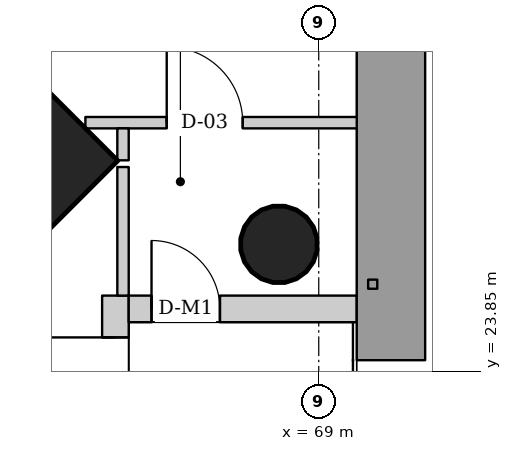
"""IFC4 building model, lengths in metres.
Left out: names, types, materials, properties, quantities, classifications, styles, units other than length and angle.
Written with IfcOpenShell. Run it as: python <this file> out.ifc"""

import sys

from ifc_helpers import new_model, si_unit, direction, frame, frame_2d, origin, origin_2d, place, context, subcontext, project, spatial, rectangle, hollow_circle, extrude, element, fill, save


model = new_model("IFC4")
c1 = context("Model", 3, precision=1e-05, world=origin(), true_north=direction((0.0, 1.0)))
c2 = subcontext(c1, "Body", "Model", "MODEL_VIEW")
j1 = project(units=[si_unit("LENGTHUNIT", "METRE"), si_unit("PLANEANGLEUNIT", "RADIAN")], contexts=[c1])
p1 = place(None, origin())
s1 = spatial("IfcSite", under=j1, at=p1, CompositionType="ELEMENT")
p2 = place(p1, origin())
s2 = spatial("IfcBuilding", under=s1, at=p2, CompositionType="ELEMENT")
p3 = place(p2, frame((0.0, 0.0, 36.2)))
s3 = spatial("IfcBuildingStorey", under=s2, at=p3, CompositionType="ELEMENT", Elevation=36.2)
p4 = place(p3, frame((68.514, 25.486, 0.0), z_axis=(-0.031962158256, 0.031962158256, 0.998977898093), x_axis=(-0.707106781187, -0.707106781187, 0.0)))
e1 = element("IfcColumn", 1, at=p4, inside=s3, PredefinedType="COLUMN", context=c2, shape_type="SweptSolid", body=[
    extrude(hollow_circle(Radius=0.508, WallThickness=0.04, at=origin_2d()), origin(), (0.0, 0.0, 1.0), 3.804),
])
p5 = place(p3, frame((64.414, 26.586, 0.0), z_axis=(-0.031898107953, 0.031898107953, 0.998981992539), x_axis=(-0.707106781187, -0.707106781187, 0.0)))
e2 = element("IfcColumn", 2, at=p5, inside=s3, PredefinedType="COLUMN", context=c2, shape_type="SweptSolid", body=[
    extrude(rectangle(XDim=2.8, YDim=2.8, at=origin_2d()), origin(), (0.0, 0.0, 1.0), 3.804),
])
p6 = place(p3, frame((66.325, 21.5, 0.0), z_axis=(0.0, 0.0, 1.0), x_axis=(0.0, 1.0, 0.0)))
e3 = element("IfcWall", 3, at=p6, inside=s3, PredefinedType="SOLIDWALL", context=c2, shape_type="SweptSolid", body=[
    extrude(rectangle(XDim=3.35, YDim=0.35, at=frame_2d((1.675, 0.0))), origin(), (0.0, 0.0, 1.0), 3.62),
])
p7 = place(p6, frame((1.8, 0.0, 0.0)))
e4 = element("IfcOpeningElement", 4, at=p7, cuts=e3, PredefinedType="OPENING", context=c2, shape_type="SweptSolid", body=[
    extrude(rectangle(XDim=1.0, YDim=2.4, at=frame_2d((0.5, 1.2))), frame((0.0, 0.185, 0.0), z_axis=(0.0, -1.0, 0.0), x_axis=(1.0, 0.0, 0.0)), (0.0, 0.0, 1.0), 0.37),
])
p8 = place(p3, frame((66.5, 24.675, 0.0), z_axis=(0.0, 0.0, 1.0), x_axis=(1.0, 0.0, 0.0)))
e5 = element("IfcWall", 5, at=p8, inside=s3, PredefinedType="SOLIDWALL", context=c2, shape_type="SweptSolid", body=[
    extrude(rectangle(XDim=3.0, YDim=0.35, at=frame_2d((1.5, 0.0))), origin(), (0.0, 0.0, 1.0), 3.62),
])
p9 = place(p8, frame((0.3, 0.0, 0.0)))
e6 = element("IfcOpeningElement", 6, at=p9, cuts=e5, PredefinedType="OPENING", context=c2, shape_type="SweptSolid", body=[
    extrude(rectangle(XDim=0.9, YDim=2.1, at=frame_2d((0.45, 1.05))), frame((0.0, 0.185, 0.0), z_axis=(0.0, -1.0, 0.0), x_axis=(1.0, 0.0, 0.0)), (0.0, 0.0, 1.0), 0.37),
])
p10 = place(p3, frame((65.93, 27.125, 0.0), z_axis=(0.0, 0.0, 1.0), x_axis=(1.0, 0.0, 0.0)))
e7 = element("IfcWall", 7, at=p10, inside=s3, PredefinedType="PARTITIONING", context=c2, shape_type="SweptSolid", body=[
    extrude(rectangle(XDim=3.61, YDim=0.15, at=frame_2d((1.805, 0.0))), origin(), (0.0, 0.0, 1.0), 3.02),
])
p11 = place(p10, frame((1.07, 0.0, 0.0)))
e8 = element("IfcOpeningElement", 8, at=p11, cuts=e7, PredefinedType="OPENING", context=c2, shape_type="SweptSolid", body=[
    extrude(rectangle(XDim=1.0, YDim=2.1, at=frame_2d((0.5, 1.05))), frame((0.0, 0.085, 0.0), z_axis=(0.0, -1.0, 0.0), x_axis=(1.0, 0.0, 0.0)), (0.0, 0.0, 1.0), 0.17),
])
p12 = place(p3, frame((66.425, 27.05, 0.0), z_axis=(0.0, 0.0, 1.0), x_axis=(0.0, -1.0, 0.0)))
e9 = element("IfcWall", 9, at=p12, inside=s3, PredefinedType="PARTITIONING", context=c2, shape_type="SweptSolid", body=[
    extrude(rectangle(XDim=0.42, YDim=0.15, at=frame_2d((0.21, 0.0))), origin(), (0.0, 0.0, 1.0), 3.62),
])
p13 = place(p3, frame((66.425, 26.542, 0.0), z_axis=(0.0, 0.0, 1.0), x_axis=(0.0, -1.0, 0.0)))
e10 = element("IfcWall", 10, at=p13, inside=s3, PredefinedType="PARTITIONING", context=c2, shape_type="SweptSolid", body=[
    extrude(rectangle(XDim=1.691, YDim=0.15, at=frame_2d((0.846, 0.0))), origin(), (0.0, 0.0, 1.0), 3.07),
])
p14 = place(p9, origin())
e11 = element("IfcDoor", 11, at=p14, inside=s3, OperationType="SINGLE_SWING_LEFT", PredefinedType="DOOR", context=c2, shape_type="SweptSolid", body=[
    extrude(rectangle(XDim=0.9, YDim=2.1, at=frame_2d((0.45, 1.05))), frame((0.0, 0.025, 0.0), z_axis=(0.0, -1.0, 0.0), x_axis=(1.0, 0.0, 0.0)), (0.0, 0.0, 1.0), 0.05),
])
fill(e6, e11)
p15 = place(p7, origin())
e12 = element("IfcDoor", 12, at=p15, inside=s3, OperationType="SINGLE_SWING_RIGHT", PredefinedType="DOOR", context=c2, shape_type="SweptSolid", body=[
    extrude(rectangle(XDim=1.0, YDim=2.4, at=frame_2d((0.5, 1.2))), frame((0.0, 0.025, 0.0), z_axis=(0.0, -1.0, 0.0), x_axis=(1.0, 0.0, 0.0)), (0.0, 0.0, 1.0), 0.05),
])
fill(e4, e12)
p16 = place(p11, origin())
e13 = element("IfcDoor", 13, at=p16, inside=s3, OperationType="SINGLE_SWING_LEFT", PredefinedType="DOOR", context=c2, shape_type="SweptSolid", body=[
    extrude(rectangle(XDim=1.0, YDim=2.1, at=frame_2d((0.5, 1.05))), frame((0.0, 0.025, 0.0), z_axis=(0.0, -1.0, 0.0), x_axis=(1.0, 0.0, 0.0)), (0.0, 0.0, 1.0), 0.05),
])
fill(e8, e13)
save(model, sys.argv[1])
